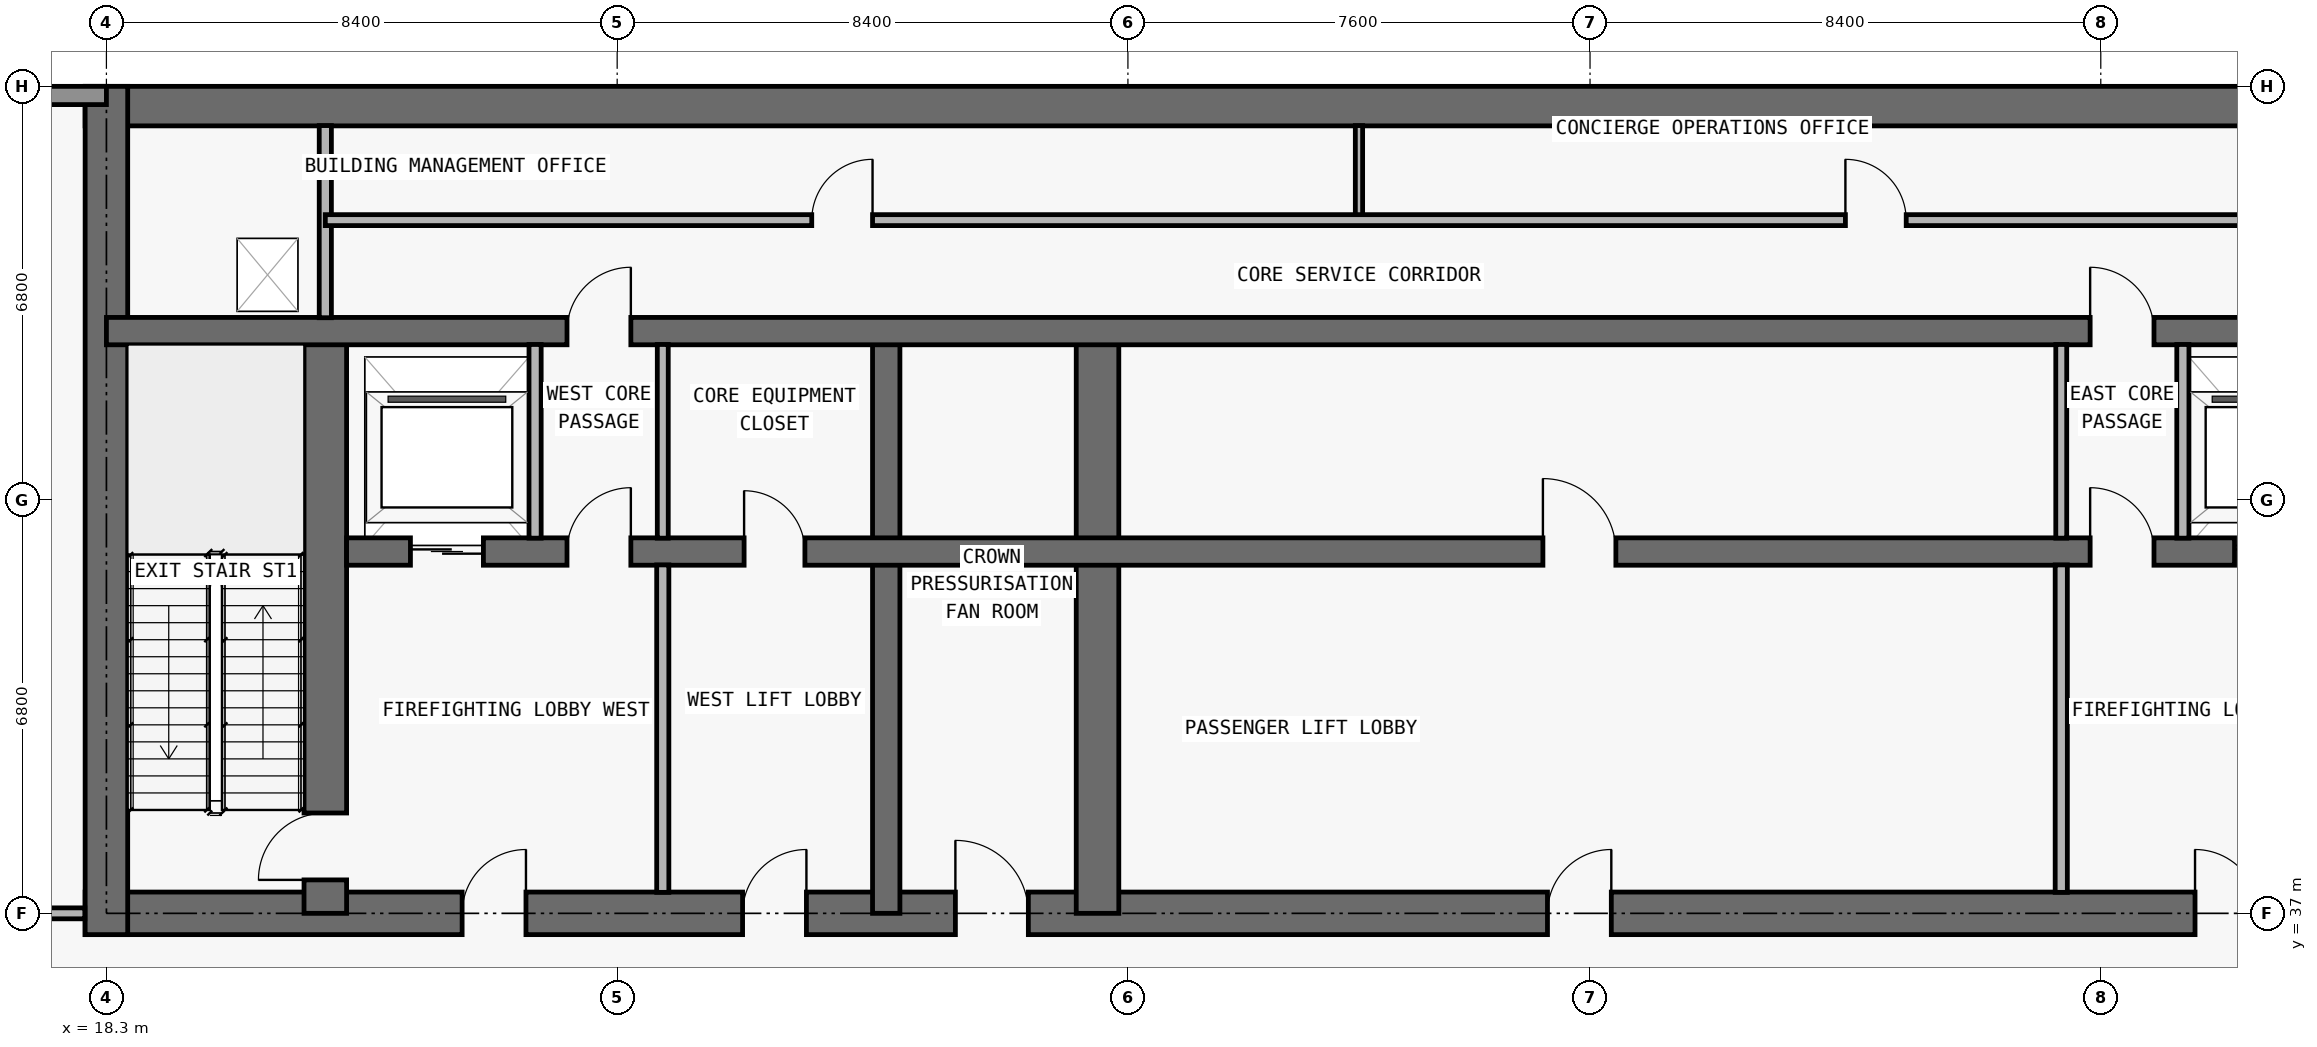
"""IFC4 building model, lengths in metres.
Left out: names, types, materials, properties, quantities, classifications, styles, units other than length and angle.
Written with IfcOpenShell. Run it as: python <this file> out.ifc"""

import sys

from ifc_helpers import new_model, si_unit, direction, frame, frame_2d, origin, place, context, subcontext, project, spatial, rectangle, extrude, element, fill, save


model = new_model("IFC4")
c1 = context("Model", 3, precision=1e-05, world=origin(), true_north=direction((0.0, 1.0)))
c2 = subcontext(c1, "Body", "Model", "MODEL_VIEW")
j1 = project(units=[si_unit("LENGTHUNIT", "METRE"), si_unit("PLANEANGLEUNIT", "RADIAN")], contexts=[c1])
p1 = place(None, origin())
s1 = spatial("IfcSite", under=j1, at=p1, CompositionType="ELEMENT")
p2 = place(p1, origin())
s2 = spatial("IfcBuilding", under=s1, at=p2, CompositionType="ELEMENT")
p3 = place(p2, frame((0.0, 0.0, 279.4)))
s3 = spatial("IfcBuildingStorey", under=s2, at=p3, CompositionType="ELEMENT", Elevation=279.4)
p4 = place(p3, frame((17.95, 37.0, 0.0), z_axis=(0.0, 0.0, 1.0), x_axis=(1.0, 0.0, 0.0)))
e1 = element("IfcWall", 1, at=p4, inside=s3, PredefinedType="SHEAR", context=c2, shape_type="SweptSolid", body=[
    extrude(rectangle(XDim=41.9, YDim=0.7, at=frame_2d((20.95, 0.0))), origin(), (0.0, 0.0, 1.0), 5.1),
])
p5 = place(p4, frame((14.312, 0.0, 0.0)))
e2 = element("IfcOpeningElement", 2, at=p5, cuts=e1, PredefinedType="OPENING", context=c2, shape_type="SweptSolid", body=[
    extrude(rectangle(XDim=1.2, YDim=2.2, at=frame_2d((0.6, 1.1))), frame((0.0, 0.36, 0.0), z_axis=(0.0, -1.0, 0.0), x_axis=(1.0, 0.0, 0.0)), (0.0, 0.0, 1.0), 0.72),
])
p6 = place(p4, frame((6.2, 0.0, 0.0)))
e3 = element("IfcOpeningElement", 3, at=p6, cuts=e1, PredefinedType="OPENING", context=c2, shape_type="SweptSolid", body=[
    extrude(rectangle(XDim=1.05, YDim=2.15, at=frame_2d((0.525, 1.075))), frame((0.0, 0.36, 0.0), z_axis=(0.0, -1.0, 0.0), x_axis=(1.0, 0.0, 0.0)), (0.0, 0.0, 1.0), 0.72),
])
p7 = place(p4, frame((34.7, 0.0, 0.0)))
e4 = element("IfcOpeningElement", 4, at=p7, cuts=e1, PredefinedType="OPENING", context=c2, shape_type="SweptSolid", body=[
    extrude(rectangle(XDim=1.05, YDim=2.15, at=frame_2d((0.525, 1.075))), frame((0.0, 0.36, 0.0), z_axis=(0.0, -1.0, 0.0), x_axis=(1.0, 0.0, 0.0)), (0.0, 0.0, 1.0), 0.72),
])
p8 = place(p4, frame((10.812, 0.0, 0.0)))
e5 = element("IfcOpeningElement", 5, at=p8, cuts=e1, PredefinedType="OPENING", context=c2, shape_type="SweptSolid", body=[
    extrude(rectangle(XDim=1.05, YDim=2.15, at=frame_2d((0.525, 1.075))), frame((0.0, 0.36, 0.0), z_axis=(0.0, -1.0, 0.0), x_axis=(1.0, 0.0, 0.0)), (0.0, 0.0, 1.0), 0.72),
])
p9 = place(p4, frame((24.05, 0.0, 0.0)))
e6 = element("IfcOpeningElement", 6, at=p9, cuts=e1, PredefinedType="OPENING", context=c2, shape_type="SweptSolid", body=[
    extrude(rectangle(XDim=1.05, YDim=2.15, at=frame_2d((0.525, 1.075))), frame((0.0, 0.36, 0.0), z_axis=(0.0, -1.0, 0.0), x_axis=(1.0, 0.0, 0.0)), (0.0, 0.0, 1.0), 0.72),
])
p10 = place(p3, frame((17.95, 50.275, 0.0), z_axis=(0.0, 0.0, 1.0), x_axis=(1.0, 0.0, 0.0)))
e7 = element("IfcWall", 7, at=p10, inside=s3, PredefinedType="SHEAR", context=c2, shape_type="SweptSolid", body=[
    extrude(rectangle(XDim=41.9, YDim=0.65, at=frame_2d((20.95, 0.0))), origin(), (0.0, 0.0, 1.0), 5.1),
])
p11 = place(p3, frame((18.3, 36.65, 0.0), z_axis=(0.0, 0.0, 1.0), x_axis=(0.0, 1.0, 0.0)))
e8 = element("IfcWall", 8, at=p11, inside=s3, PredefinedType="SHEAR", context=c2, shape_type="SweptSolid", body=[
    extrude(rectangle(XDim=13.95, YDim=0.7, at=frame_2d((6.975, 0.0))), origin(), (0.0, 0.0, 1.0), 5.1),
])
p12 = place(p3, frame((21.9, 37.0, 0.0), z_axis=(0.0, 0.0, 1.0), x_axis=(0.0, 1.0, 0.0)))
e9 = element("IfcWall", 9, at=p12, inside=s3, PredefinedType="SHEAR", context=c2, shape_type="SweptSolid", body=[
    extrude(rectangle(XDim=9.575, YDim=0.7, at=frame_2d((4.788, 0.0))), origin(), (0.0, 0.0, 1.0), 5.1),
])
p13 = place(p12, frame((0.55, 0.0, 0.0)))
e10 = element("IfcOpeningElement", 10, at=p13, cuts=e9, PredefinedType="OPENING", context=c2, shape_type="SweptSolid", body=[
    extrude(rectangle(XDim=1.1, YDim=2.15, at=frame_2d((0.55, 1.075))), frame((0.0, 0.36, 0.0), z_axis=(0.0, -1.0, 0.0), x_axis=(1.0, 0.0, 0.0)), (0.0, 0.0, 1.0), 0.72),
])
p14 = place(p3, frame((31.125, 37.0, 0.0), z_axis=(0.0, 0.0, 1.0), x_axis=(0.0, 1.0, 0.0)))
e11 = element("IfcWall", 11, at=p14, inside=s3, PredefinedType="SHEAR", context=c2, shape_type="SweptSolid", body=[
    extrude(rectangle(XDim=9.575, YDim=0.45, at=frame_2d((4.788, 0.0))), origin(), (0.0, 0.0, 1.0), 5.1),
])
p15 = place(p3, frame((34.6, 37.0, 0.0), z_axis=(0.0, 0.0, 1.0), x_axis=(0.0, 1.0, 0.0)))
e12 = element("IfcWall", 12, at=p15, inside=s3, PredefinedType="SHEAR", context=c2, shape_type="SweptSolid", body=[
    extrude(rectangle(XDim=9.575, YDim=0.7, at=frame_2d((4.788, 0.0))), origin(), (0.0, 0.0, 1.0), 5.1),
])
p16 = place(p3, frame((22.25, 42.95, 0.0), z_axis=(0.0, 0.0, 1.0), x_axis=(1.0, 0.0, 0.0)))
e13 = element("IfcWall", 13, at=p16, inside=s3, PredefinedType="SHEAR", context=c2, shape_type="SweptSolid", body=[
    extrude(rectangle(XDim=33.3, YDim=0.45, at=frame_2d((16.65, 0.0))), origin(), (0.0, 0.0, 1.0), 5.1),
])
p17 = place(p16, frame((1.05, 0.0, 0.0)))
e14 = element("IfcOpeningElement", 14, at=p17, cuts=e13, PredefinedType="OPENING", context=c2, shape_type="SweptSolid", body=[
    extrude(rectangle(XDim=1.2, YDim=2.2, at=frame_2d((0.6, 1.1))), frame((0.0, 0.235, 0.0), z_axis=(0.0, -1.0, 0.0), x_axis=(1.0, 0.0, 0.0)), (0.0, 0.0, 1.0), 0.47),
])
p18 = place(p16, frame((31.05, 0.0, 0.0)))
e15 = element("IfcOpeningElement", 15, at=p18, cuts=e13, PredefinedType="OPENING", context=c2, shape_type="SweptSolid", body=[
    extrude(rectangle(XDim=1.2, YDim=2.2, at=frame_2d((0.6, 1.1))), frame((0.0, 0.235, 0.0), z_axis=(0.0, -1.0, 0.0), x_axis=(1.0, 0.0, 0.0)), (0.0, 0.0, 1.0), 0.47),
])
p19 = place(p16, frame((3.625, 0.0, 0.0)))
e16 = element("IfcOpeningElement", 16, at=p19, cuts=e13, PredefinedType="OPENING", context=c2, shape_type="SweptSolid", body=[
    extrude(rectangle(XDim=1.05, YDim=2.15, at=frame_2d((0.525, 1.075))), frame((0.0, 0.235, 0.0), z_axis=(0.0, -1.0, 0.0), x_axis=(1.0, 0.0, 0.0)), (0.0, 0.0, 1.0), 0.47),
])
p20 = place(p16, frame((28.675, 0.0, 0.0)))
e17 = element("IfcOpeningElement", 17, at=p20, cuts=e13, PredefinedType="OPENING", context=c2, shape_type="SweptSolid", body=[
    extrude(rectangle(XDim=1.05, YDim=2.15, at=frame_2d((0.525, 1.075))), frame((0.0, 0.235, 0.0), z_axis=(0.0, -1.0, 0.0), x_axis=(1.0, 0.0, 0.0)), (0.0, 0.0, 1.0), 0.47),
])
p21 = place(p16, frame((6.538, 0.0, 0.0)))
e18 = element("IfcOpeningElement", 18, at=p21, cuts=e13, PredefinedType="OPENING", context=c2, shape_type="SweptSolid", body=[
    extrude(rectangle(XDim=1.0, YDim=2.2, at=frame_2d((0.5, 1.1))), frame((0.0, 0.235, 0.0), z_axis=(0.0, -1.0, 0.0), x_axis=(1.0, 0.0, 0.0)), (0.0, 0.0, 1.0), 0.47),
])
p22 = place(p16, frame((19.675, 0.0, 0.0)))
e19 = element("IfcOpeningElement", 19, at=p22, cuts=e13, PredefinedType="OPENING", context=c2, shape_type="SweptSolid", body=[
    extrude(rectangle(XDim=1.2, YDim=2.2, at=frame_2d((0.6, 1.1))), frame((0.0, 0.235, 0.0), z_axis=(0.0, -1.0, 0.0), x_axis=(1.0, 0.0, 0.0)), (0.0, 0.0, 1.0), 0.47),
])
p23 = place(p3, frame((18.3, 46.575, 0.0), z_axis=(0.0, 0.0, 1.0), x_axis=(1.0, 0.0, 0.0)))
e20 = element("IfcWall", 20, at=p23, inside=s3, PredefinedType="SHEAR", context=c2, shape_type="SweptSolid", body=[
    extrude(rectangle(XDim=41.2, YDim=0.45, at=frame_2d((20.6, 0.0))), origin(), (0.0, 0.0, 1.0), 5.1),
])
p24 = place(p23, frame((7.575, 0.0, 0.0)))
e21 = element("IfcOpeningElement", 21, at=p24, cuts=e20, PredefinedType="OPENING", context=c2, shape_type="SweptSolid", body=[
    extrude(rectangle(XDim=1.05, YDim=2.15, at=frame_2d((0.525, 1.075))), frame((0.0, 0.235, 0.0), z_axis=(0.0, -1.0, 0.0), x_axis=(1.0, 0.0, 0.0)), (0.0, 0.0, 1.0), 0.47),
])
p25 = place(p23, frame((32.625, 0.0, 0.0)))
e22 = element("IfcOpeningElement", 22, at=p25, cuts=e20, PredefinedType="OPENING", context=c2, shape_type="SweptSolid", body=[
    extrude(rectangle(XDim=1.05, YDim=2.15, at=frame_2d((0.525, 1.075))), frame((0.0, 0.235, 0.0), z_axis=(0.0, -1.0, 0.0), x_axis=(1.0, 0.0, 0.0)), (0.0, 0.0, 1.0), 0.47),
])
p26 = place(p3, frame((16.5, 50.45, 0.0), z_axis=(0.0, 0.0, 1.0), x_axis=(1.0, 0.0, 0.0)))
e23 = element("IfcWall", 23, at=p26, inside=s3, PredefinedType="STANDARD", context=c2, shape_type="SweptSolid", body=[
    extrude(rectangle(XDim=1.8, YDim=0.3, at=frame_2d((0.9, 0.0))), origin(), (0.0, 0.0, 1.0), 5.1),
])
p27 = place(p3, frame((21.9, 46.795, 0.0), z_axis=(0.0, 0.0, 1.0), x_axis=(0.0, 1.0, 0.0)))
e24 = element("IfcWall", 24, at=p27, inside=s3, PredefinedType="PARTITIONING", context=c2, shape_type="SweptSolid", body=[
    extrude(rectangle(XDim=3.16, YDim=0.2, at=frame_2d((1.58, 0.0))), origin(), (0.0, 0.0, 1.0), 5.1),
])
p28 = place(p3, frame((25.35, 43.17, 0.0), z_axis=(0.0, 0.0, 1.0), x_axis=(0.0, 1.0, 0.0)))
e25 = element("IfcWall", 25, at=p28, inside=s3, PredefinedType="PARTITIONING", context=c2, shape_type="SweptSolid", body=[
    extrude(rectangle(XDim=3.185, YDim=0.2, at=frame_2d((1.593, 0.0))), origin(), (0.0, 0.0, 1.0), 5.1),
])
p29 = place(p3, frame((27.45, 37.345, 0.0), z_axis=(0.0, 0.0, 1.0), x_axis=(0.0, 1.0, 0.0)))
e26 = element("IfcWall", 26, at=p29, inside=s3, PredefinedType="PARTITIONING", context=c2, shape_type="SweptSolid", body=[
    extrude(rectangle(XDim=5.385, YDim=0.2, at=frame_2d((2.692, 0.0))), origin(), (0.0, 0.0, 1.0), 5.1),
])
p30 = place(p3, frame((27.45, 43.17, 0.0), z_axis=(0.0, 0.0, 1.0), x_axis=(0.0, 1.0, 0.0)))
e27 = element("IfcWall", 27, at=p30, inside=s3, PredefinedType="PARTITIONING", context=c2, shape_type="SweptSolid", body=[
    extrude(rectangle(XDim=3.185, YDim=0.18, at=frame_2d((1.593, 0.0))), origin(), (0.0, 0.0, 1.0), 5.1),
])
p31 = place(p3, frame((38.9, 48.4, 0.0), z_axis=(0.0, 0.0, 1.0), x_axis=(0.0, 1.0, 0.0)))
e28 = element("IfcWall", 28, at=p31, inside=s3, PredefinedType="PARTITIONING", context=c2, shape_type="SweptSolid", body=[
    extrude(rectangle(XDim=1.555, YDim=0.12, at=frame_2d((0.778, 0.0))), origin(), (0.0, 0.0, 1.0), 5.1),
])
p32 = place(p3, frame((50.45, 37.345, 0.0), z_axis=(0.0, 0.0, 1.0), x_axis=(0.0, 1.0, 0.0)))
e29 = element("IfcWall", 29, at=p32, inside=s3, PredefinedType="PARTITIONING", context=c2, shape_type="SweptSolid", body=[
    extrude(rectangle(XDim=5.385, YDim=0.2, at=frame_2d((2.692, 0.0))), origin(), (0.0, 0.0, 1.0), 5.1),
])
p33 = place(p3, frame((50.45, 43.17, 0.0), z_axis=(0.0, 0.0, 1.0), x_axis=(0.0, 1.0, 0.0)))
e30 = element("IfcWall", 30, at=p33, inside=s3, PredefinedType="PARTITIONING", context=c2, shape_type="SweptSolid", body=[
    extrude(rectangle(XDim=3.185, YDim=0.18, at=frame_2d((1.593, 0.0))), origin(), (0.0, 0.0, 1.0), 5.1),
])
p34 = place(p3, frame((52.45, 43.17, 0.0), z_axis=(0.0, 0.0, 1.0), x_axis=(0.0, 1.0, 0.0)))
e31 = element("IfcWall", 31, at=p34, inside=s3, PredefinedType="PARTITIONING", context=c2, shape_type="SweptSolid", body=[
    extrude(rectangle(XDim=3.185, YDim=0.2, at=frame_2d((1.593, 0.0))), origin(), (0.0, 0.0, 1.0), 5.1),
])
p35 = place(p3, frame((16.5, 37.0, 0.0), z_axis=(0.0, 0.0, 1.0), x_axis=(1.0, 0.0, 0.0)))
e32 = element("IfcWall", 32, at=p35, inside=s3, PredefinedType="PARTITIONING", context=c2, shape_type="SweptSolid", body=[
    extrude(rectangle(XDim=1.445, YDim=0.18, at=frame_2d((0.723, 0.0))), origin(), (0.0, 0.0, 1.0), 5.1),
])
p36 = place(p3, frame((21.9, 48.4, 0.0), z_axis=(0.0, 0.0, 1.0), x_axis=(1.0, 0.0, 0.0)))
e33 = element("IfcWall", 33, at=p36, inside=s3, PredefinedType="PARTITIONING", context=c2, shape_type="SweptSolid", body=[
    extrude(rectangle(XDim=34.0, YDim=0.18, at=frame_2d((17.0, 0.0))), origin(), (0.0, 0.0, 1.0), 5.1),
])
p37 = place(p36, frame((8.0, 0.0, 0.0)))
e34 = element("IfcOpeningElement", 34, at=p37, cuts=e33, PredefinedType="OPENING", context=c2, shape_type="SweptSolid", body=[
    extrude(rectangle(XDim=1.0, YDim=2.2, at=frame_2d((0.5, 1.1))), frame((0.0, 0.1, 0.0), z_axis=(0.0, -1.0, 0.0), x_axis=(1.0, 0.0, 0.0)), (0.0, 0.0, 1.0), 0.2),
])
p38 = place(p36, frame((25.0, 0.0, 0.0)))
e35 = element("IfcOpeningElement", 35, at=p38, cuts=e33, PredefinedType="OPENING", context=c2, shape_type="SweptSolid", body=[
    extrude(rectangle(XDim=1.0, YDim=2.2, at=frame_2d((0.5, 1.1))), frame((0.0, 0.1, 0.0), z_axis=(0.0, -1.0, 0.0), x_axis=(1.0, 0.0, 0.0)), (0.0, 0.0, 1.0), 0.2),
])
p39 = place(p17, origin())
e36 = element("IfcDoor", 36, at=p39, inside=s3, OperationType="DOUBLE_DOOR_SLIDING", PredefinedType="DOOR", context=c2, shape_type="SweptSolid", body=[
    extrude(rectangle(XDim=1.2, YDim=2.2, at=frame_2d((0.6, 1.1))), frame((0.0, 0.025, 0.0), z_axis=(0.0, -1.0, 0.0), x_axis=(1.0, 0.0, 0.0)), (0.0, 0.0, 1.0), 0.05),
])
fill(e14, e36)
p40 = place(p18, origin())
e37 = element("IfcDoor", 37, at=p40, inside=s3, OperationType="DOUBLE_DOOR_SLIDING", PredefinedType="DOOR", context=c2, shape_type="SweptSolid", body=[
    extrude(rectangle(XDim=1.2, YDim=2.2, at=frame_2d((0.6, 1.1))), frame((0.0, 0.025, 0.0), z_axis=(0.0, -1.0, 0.0), x_axis=(1.0, 0.0, 0.0)), (0.0, 0.0, 1.0), 0.05),
])
fill(e15, e37)
p41 = place(p5, origin())
e38 = element("IfcDoor", 38, at=p41, inside=s3, OperationType="SINGLE_SWING_LEFT", PredefinedType="DOOR", context=c2, shape_type="SweptSolid", body=[
    extrude(rectangle(XDim=1.2, YDim=2.2, at=frame_2d((0.6, 1.1))), frame((0.0, 0.025, 0.0), z_axis=(0.0, -1.0, 0.0), x_axis=(1.0, 0.0, 0.0)), (0.0, 0.0, 1.0), 0.05),
])
fill(e2, e38)
p42 = place(p6, origin())
e39 = element("IfcDoor", 39, at=p42, inside=s3, OperationType="SINGLE_SWING_RIGHT", PredefinedType="DOOR", context=c2, shape_type="SweptSolid", body=[
    extrude(rectangle(XDim=1.05, YDim=2.15, at=frame_2d((0.525, 1.075))), frame((0.0, 0.025, 0.0), z_axis=(0.0, -1.0, 0.0), x_axis=(1.0, 0.0, 0.0)), (0.0, 0.0, 1.0), 0.05),
])
fill(e3, e39)
p43 = place(p13, origin())
e40 = element("IfcDoor", 40, at=p43, inside=s3, OperationType="SINGLE_SWING_LEFT", PredefinedType="DOOR", context=c2, shape_type="SweptSolid", body=[
    extrude(rectangle(XDim=1.1, YDim=2.15, at=frame_2d((0.55, 1.075))), frame((0.0, 0.025, 0.0), z_axis=(0.0, -1.0, 0.0), x_axis=(1.0, 0.0, 0.0)), (0.0, 0.0, 1.0), 0.05),
])
fill(e10, e40)
p44 = place(p19, origin())
e41 = element("IfcDoor", 41, at=p44, inside=s3, OperationType="SINGLE_SWING_RIGHT", PredefinedType="DOOR", context=c2, shape_type="SweptSolid", body=[
    extrude(rectangle(XDim=1.05, YDim=2.15, at=frame_2d((0.525, 1.075))), frame((0.0, 0.025, 0.0), z_axis=(0.0, -1.0, 0.0), x_axis=(1.0, 0.0, 0.0)), (0.0, 0.0, 1.0), 0.05),
])
fill(e16, e41)
p45 = place(p7, origin())
e42 = element("IfcDoor", 42, at=p45, inside=s3, OperationType="SINGLE_SWING_LEFT", PredefinedType="DOOR", context=c2, shape_type="SweptSolid", body=[
    extrude(rectangle(XDim=1.05, YDim=2.15, at=frame_2d((0.525, 1.075))), frame((0.0, 0.025, 0.0), z_axis=(0.0, -1.0, 0.0), x_axis=(1.0, 0.0, 0.0)), (0.0, 0.0, 1.0), 0.05),
])
fill(e4, e42)
p46 = place(p20, origin())
e43 = element("IfcDoor", 43, at=p46, inside=s3, OperationType="SINGLE_SWING_LEFT", PredefinedType="DOOR", context=c2, shape_type="SweptSolid", body=[
    extrude(rectangle(XDim=1.05, YDim=2.15, at=frame_2d((0.525, 1.075))), frame((0.0, 0.025, 0.0), z_axis=(0.0, -1.0, 0.0), x_axis=(1.0, 0.0, 0.0)), (0.0, 0.0, 1.0), 0.05),
])
fill(e17, e43)
p47 = place(p8, origin())
e44 = element("IfcDoor", 44, at=p47, inside=s3, OperationType="SINGLE_SWING_RIGHT", PredefinedType="DOOR", context=c2, shape_type="SweptSolid", body=[
    extrude(rectangle(XDim=1.05, YDim=2.15, at=frame_2d((0.525, 1.075))), frame((0.0, 0.025, 0.0), z_axis=(0.0, -1.0, 0.0), x_axis=(1.0, 0.0, 0.0)), (0.0, 0.0, 1.0), 0.05),
])
fill(e5, e44)
p48 = place(p21, origin())
e45 = element("IfcDoor", 45, at=p48, inside=s3, OperationType="SINGLE_SWING_LEFT", PredefinedType="DOOR", context=c2, shape_type="SweptSolid", body=[
    extrude(rectangle(XDim=1.0, YDim=2.2, at=frame_2d((0.5, 1.1))), frame((0.0, 0.025, 0.0), z_axis=(0.0, -1.0, 0.0), x_axis=(1.0, 0.0, 0.0)), (0.0, 0.0, 1.0), 0.05),
])
fill(e18, e45)
p49 = place(p9, origin())
e46 = element("IfcDoor", 46, at=p49, inside=s3, OperationType="SINGLE_SWING_RIGHT", PredefinedType="DOOR", context=c2, shape_type="SweptSolid", body=[
    extrude(rectangle(XDim=1.05, YDim=2.15, at=frame_2d((0.525, 1.075))), frame((0.0, 0.025, 0.0), z_axis=(0.0, -1.0, 0.0), x_axis=(1.0, 0.0, 0.0)), (0.0, 0.0, 1.0), 0.05),
])
fill(e6, e46)
p50 = place(p22, origin())
e47 = element("IfcDoor", 47, at=p50, inside=s3, OperationType="SINGLE_SWING_LEFT", PredefinedType="DOOR", context=c2, shape_type="SweptSolid", body=[
    extrude(rectangle(XDim=1.2, YDim=2.2, at=frame_2d((0.6, 1.1))), frame((0.0, 0.025, 0.0), z_axis=(0.0, -1.0, 0.0), x_axis=(1.0, 0.0, 0.0)), (0.0, 0.0, 1.0), 0.05),
])
fill(e19, e47)
p51 = place(p24, origin())
e48 = element("IfcDoor", 48, at=p51, inside=s3, OperationType="SINGLE_SWING_RIGHT", PredefinedType="DOOR", context=c2, shape_type="SweptSolid", body=[
    extrude(rectangle(XDim=1.05, YDim=2.15, at=frame_2d((0.525, 1.075))), frame((0.0, 0.025, 0.0), z_axis=(0.0, -1.0, 0.0), x_axis=(1.0, 0.0, 0.0)), (0.0, 0.0, 1.0), 0.05),
])
fill(e21, e48)
p52 = place(p25, origin())
e49 = element("IfcDoor", 49, at=p52, inside=s3, OperationType="SINGLE_SWING_LEFT", PredefinedType="DOOR", context=c2, shape_type="SweptSolid", body=[
    extrude(rectangle(XDim=1.05, YDim=2.15, at=frame_2d((0.525, 1.075))), frame((0.0, 0.025, 0.0), z_axis=(0.0, -1.0, 0.0), x_axis=(1.0, 0.0, 0.0)), (0.0, 0.0, 1.0), 0.05),
])
fill(e22, e49)
p53 = place(p37, origin())
e50 = element("IfcDoor", 50, at=p53, inside=s3, OperationType="SINGLE_SWING_RIGHT", PredefinedType="DOOR", context=c2, shape_type="SweptSolid", body=[
    extrude(rectangle(XDim=1.0, YDim=2.2, at=frame_2d((0.5, 1.1))), frame((0.0, 0.025, 0.0), z_axis=(0.0, -1.0, 0.0), x_axis=(1.0, 0.0, 0.0)), (0.0, 0.0, 1.0), 0.05),
])
fill(e34, e50)
p54 = place(p38, origin())
e51 = element("IfcDoor", 51, at=p54, inside=s3, OperationType="SINGLE_SWING_LEFT", PredefinedType="DOOR", context=c2, shape_type="SweptSolid", body=[
    extrude(rectangle(XDim=1.0, YDim=2.2, at=frame_2d((0.5, 1.1))), frame((0.0, 0.025, 0.0), z_axis=(0.0, -1.0, 0.0), x_axis=(1.0, 0.0, 0.0)), (0.0, 0.0, 1.0), 0.05),
])
fill(e35, e51)
save(model, sys.argv[1])
